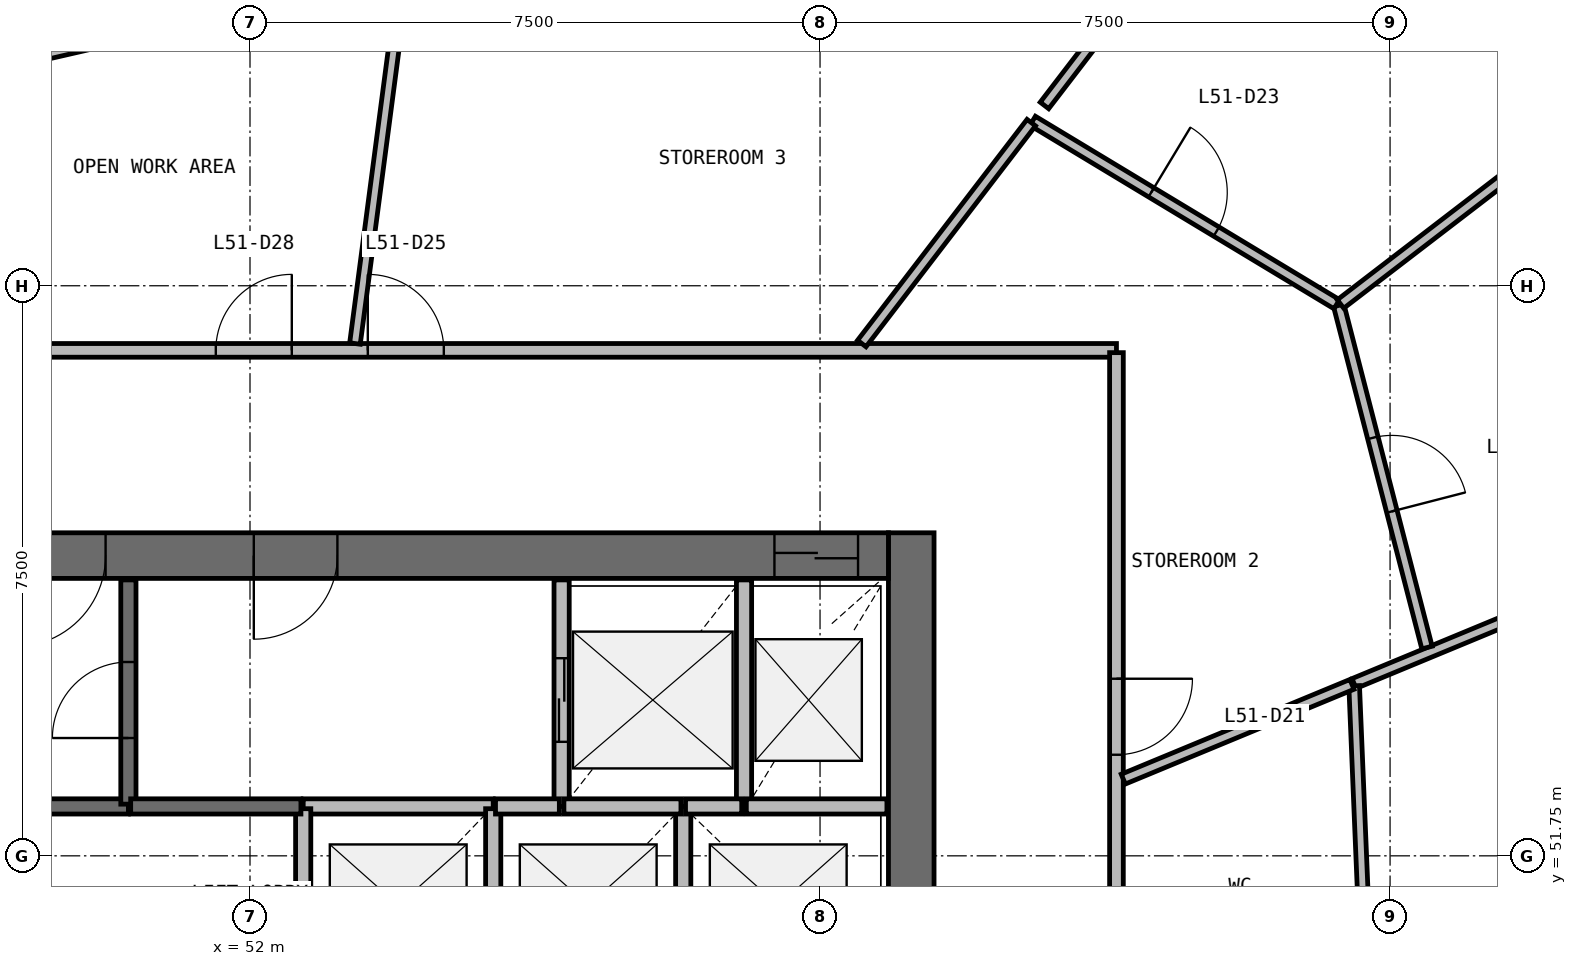
"""IFC4 building model, lengths in metres.
Left out: names, types, materials, properties, quantities, classifications, styles, units other than length and angle.
Written with IfcOpenShell. Run it as: python <this file> out.ifc"""

import sys

from ifc_helpers import new_model, si_unit, direction, frame, frame_2d, origin, place, context, subcontext, project, spatial, rectangle, extrude, source, transform, mapped, element, fill, save


model = new_model("IFC4")
c1 = context("Model", 3, precision=1e-05, world=origin(), true_north=direction((0.0, 1.0)))
c2 = subcontext(c1, "Body", "Model", "MODEL_VIEW")
j1 = project(units=[si_unit("LENGTHUNIT", "METRE"), si_unit("PLANEANGLEUNIT", "RADIAN")], contexts=[c1])
p1 = place(None, origin())
s1 = spatial("IfcSite", under=j1, at=p1, CompositionType="ELEMENT")
p2 = place(p1, origin())
s2 = spatial("IfcBuilding", under=s1, at=p2, CompositionType="ELEMENT")
p3 = place(p2, frame((0.0, 0.0, 211.1)))
s3 = spatial("IfcBuildingStorey", under=s2, at=p3, CompositionType="ELEMENT", Elevation=211.1)
p4 = place(p3, frame((60.7, 40.0, 0.0), z_axis=(0.0, 0.0, 1.0), x_axis=(0.0, 1.0, 0.0)))
e1 = element("IfcWall", 1, at=p4, inside=s3, PredefinedType="SHEAR", context=c2, shape_type="SweptSolid", body=[
    extrude(rectangle(XDim=16.0, YDim=0.6, at=frame_2d((8.0, 0.0))), origin(), (0.0, 0.0, 1.0), 3.9),
])
p5 = place(p4, frame((7.1, 0.0, 0.0)))
e2 = element("IfcOpeningElement", 2, at=p5, cuts=e1, PredefinedType="OPENING", context=c2, shape_type="SweptSolid", body=[
    extrude(rectangle(XDim=1.8, YDim=2.1, at=frame_2d((0.9, 1.05))), frame((0.0, 0.31, 0.0), z_axis=(0.0, -1.0, 0.0), x_axis=(1.0, 0.0, 0.0)), (0.0, 0.0, 1.0), 0.62),
])
p6 = place(p3, frame((60.4, 55.7, 0.0), z_axis=(0.0, 0.0, 1.0), x_axis=(-1.0, 0.0, 0.0)))
e3 = element("IfcWall", 3, at=p6, inside=s3, PredefinedType="SHEAR", context=c2, shape_type="SweptSolid", body=[
    extrude(rectangle(XDim=16.8, YDim=0.6, at=frame_2d((8.4, 0.0))), origin(), (0.0, 0.0, 1.0), 3.9),
])
p7 = place(p6, frame((0.4, 0.0, 0.0)))
e4 = element("IfcOpeningElement", 4, at=p7, cuts=e3, PredefinedType="OPENING", context=c2, shape_type="SweptSolid", body=[
    extrude(rectangle(XDim=1.1, YDim=2.1, at=frame_2d((0.55, 1.05))), frame((0.0, 0.31, 0.0), z_axis=(0.0, -1.0, 0.0), x_axis=(1.0, 0.0, 0.0)), (0.0, 0.0, 1.0), 0.62),
])
p8 = place(p6, frame((10.3, 0.0, 0.0)))
e5 = element("IfcOpeningElement", 5, at=p8, cuts=e3, PredefinedType="OPENING", context=c2, shape_type="SweptSolid", body=[
    extrude(rectangle(XDim=1.2, YDim=2.1, at=frame_2d((0.6, 1.05))), frame((0.0, 0.31, 0.0), z_axis=(0.0, -1.0, 0.0), x_axis=(1.0, 0.0, 0.0)), (0.0, 0.0, 1.0), 0.62),
])
p9 = place(p6, frame((7.25, 0.0, 0.0)))
e6 = element("IfcOpeningElement", 6, at=p9, cuts=e3, PredefinedType="OPENING", context=c2, shape_type="SweptSolid", body=[
    extrude(rectangle(XDim=1.1, YDim=2.1, at=frame_2d((0.55, 1.05))), frame((0.0, 0.31, 0.0), z_axis=(0.0, -1.0, 0.0), x_axis=(1.0, 0.0, 0.0)), (0.0, 0.0, 1.0), 0.62),
])
p10 = place(p3, frame((43.62, 52.4, 0.0), z_axis=(0.0, 0.0, 1.0), x_axis=(1.0, 0.0, 0.0)))
e7 = element("IfcWall", 7, at=p10, inside=s3, PredefinedType="SOLIDWALL", context=c2, shape_type="SweptSolid", body=[
    extrude(rectangle(XDim=6.78, YDim=0.2, at=frame_2d((3.39, 0.0))), origin(), (0.0, 0.0, 1.0), 3.58),
])
p11 = place(p3, frame((50.4, 52.43, 0.0), z_axis=(0.0, 0.0, 1.0), x_axis=(0.0, 1.0, 0.0)))
e8 = element("IfcWall", 8, at=p11, inside=s3, PredefinedType="SOLIDWALL", context=c2, shape_type="SweptSolid", body=[
    extrude(rectangle(XDim=2.95, YDim=0.2, at=frame_2d((1.475, 0.0))), origin(), (0.0, 0.0, 1.0), 3.58),
])
p12 = place(p11, frame((0.87, 0.0, 0.0)))
e9 = element("IfcOpeningElement", 9, at=p12, cuts=e8, PredefinedType="OPENING", context=c2, shape_type="SweptSolid", body=[
    extrude(rectangle(XDim=1.0, YDim=2.1, at=frame_2d((0.5, 1.05))), frame((0.0, 0.11, 0.0), z_axis=(0.0, -1.0, 0.0), x_axis=(1.0, 0.0, 0.0)), (0.0, 0.0, 1.0), 0.22),
])
p13 = place(p3, frame((56.1, 55.38, 0.0), z_axis=(0.0, 0.0, 1.0), x_axis=(0.0, -1.0, 0.0)))
e10 = element("IfcWall", 10, at=p13, inside=s3, PredefinedType="SOLIDWALL", context=c2, shape_type="SweptSolid", body=[
    extrude(rectangle(XDim=2.98, YDim=0.2, at=frame_2d((1.49, 0.0))), origin(), (0.0, 0.0, 1.0), 3.58),
])
p14 = place(p13, frame((1.03, 0.0, 0.0)))
e11 = element("IfcOpeningElement", 11, at=p14, cuts=e10, PredefinedType="OPENING", context=c2, shape_type="SweptSolid", body=[
    extrude(rectangle(XDim=1.1, YDim=2.1, at=frame_2d((0.55, 1.05))), frame((0.0, 0.11, 0.0), z_axis=(0.0, -1.0, 0.0), x_axis=(1.0, 0.0, 0.0)), (0.0, 0.0, 1.0), 0.22),
])
p15 = place(p3, frame((58.5, 52.4, 0.0), z_axis=(0.0, 0.0, 1.0), x_axis=(0.0, 1.0, 0.0)))
e12 = element("IfcWall", 12, at=p15, inside=s3, PredefinedType="SOLIDWALL", context=c2, shape_type="SweptSolid", body=[
    extrude(rectangle(XDim=2.98, YDim=0.2, at=frame_2d((1.49, 0.0))), origin(), (0.0, 0.0, 1.0), 3.58),
])
p16 = place(p3, frame((55.2, 52.4, 0.0), z_axis=(0.0, 0.0, 1.0), x_axis=(-1.0, 0.0, 0.0)))
e13 = element("IfcWall", 13, at=p16, inside=s3, PredefinedType="SOLIDWALL", context=c2, shape_type="SweptSolid", body=[
    extrude(rectangle(XDim=2.5, YDim=0.2, at=frame_2d((1.25, 0.0))), origin(), (0.0, 0.0, 1.0), 3.58),
])
for number, where, z_axis, x_axis in (
    (14, (52.7, 52.37, 0.0), (0.0, 0.0, 1.0), (0.0, -1.0, 0.0)),
    (15, (55.2, 50.01, 0.0), (0.0, 0.0, 1.0), (0.0, 1.0, 0.0)),
):
    element("IfcWall", number, at=place(p3, frame(where, z_axis=z_axis, x_axis=x_axis)), inside=s3, PredefinedType="SOLIDWALL", context=c2, shape_type="SweptSolid", body=[
        extrude(rectangle(XDim=2.36, YDim=0.2, at=frame_2d((1.18, 0.0))), origin(), (0.0, 0.0, 1.0), 3.58),
    ])
p17 = place(p3, frame((57.7, 50.01, 0.0), z_axis=(0.0, 0.0, 1.0), x_axis=(0.0, 1.0, 0.0)))
e16 = element("IfcWall", 16, at=p17, inside=s3, PredefinedType="SOLIDWALL", context=c2, shape_type="SweptSolid", body=[
    extrude(rectangle(XDim=2.39, YDim=0.2, at=frame_2d((1.195, 0.0))), origin(), (0.0, 0.0, 1.0), 3.58),
])
p18 = place(p3, frame((50.43, 52.4, 0.0), z_axis=(0.0, 0.0, 1.0), x_axis=(1.0, 0.0, 0.0)))
e17 = element("IfcWall", 17, at=p18, inside=s3, PredefinedType="SOLIDWALL", context=c2, shape_type="SweptSolid", body=[
    extrude(rectangle(XDim=2.24, YDim=0.2, at=frame_2d((1.12, 0.0))), origin(), (0.0, 0.0, 1.0), 3.58),
])
p19 = place(p3, frame((60.38, 52.4, 0.0), z_axis=(0.0, 0.0, 1.0), x_axis=(-1.0, 0.0, 0.0)))
e18 = element("IfcWall", 18, at=p19, inside=s3, PredefinedType="SOLIDWALL", context=c2, shape_type="SweptSolid", body=[
    extrude(rectangle(XDim=1.85, YDim=0.2, at=frame_2d((0.925, 0.0))), origin(), (0.0, 0.0, 1.0), 3.58),
])
p20 = place(p3, frame((57.67, 52.4, 0.0), z_axis=(0.0, 0.0, 1.0), x_axis=(-1.0, 0.0, 0.0)))
e19 = element("IfcWall", 19, at=p20, inside=s3, PredefinedType="SOLIDWALL", context=c2, shape_type="SweptSolid", body=[
    extrude(rectangle(XDim=1.54, YDim=0.2, at=frame_2d((0.77, 0.0))), origin(), (0.0, 0.0, 1.0), 3.58),
])
p21 = place(p3, frame((56.07, 52.4, 0.0), z_axis=(0.0, 0.0, 1.0), x_axis=(-1.0, 0.0, 0.0)))
e20 = element("IfcWall", 20, at=p21, inside=s3, PredefinedType="SOLIDWALL", context=c2, shape_type="SweptSolid", body=[
    extrude(rectangle(XDim=0.84, YDim=0.2, at=frame_2d((0.42, 0.0))), origin(), (0.0, 0.0, 1.0), 3.58),
])
p22 = place(p3, frame((58.47, 52.4, 0.0), z_axis=(0.0, 0.0, 1.0), x_axis=(-1.0, 0.0, 0.0)))
e21 = element("IfcWall", 21, at=p22, inside=s3, PredefinedType="SOLIDWALL", context=c2, shape_type="SweptSolid", body=[
    extrude(rectangle(XDim=0.74, YDim=0.2, at=frame_2d((0.37, 0.0))), origin(), (0.0, 0.0, 1.0), 3.58),
])
p23 = place(p3, frame((40.6, 58.4, 0.0), z_axis=(0.0, 0.0, 1.0), x_axis=(1.0, 0.0, 0.0)))
e22 = element("IfcWall", 22, at=p23, inside=s3, PredefinedType="PARTITIONING", context=c2, shape_type="SweptSolid", body=[
    extrude(rectangle(XDim=22.8, YDim=0.18, at=frame_2d((11.4, 0.0))), origin(), (0.0, 0.0, 1.0), 2.88),
])
p24 = place(p23, frame((12.95, 0.0, 0.0)))
e23 = element("IfcOpeningElement", 23, at=p24, cuts=e22, PredefinedType="OPENING", context=c2, shape_type="SweptSolid", body=[
    extrude(rectangle(XDim=1.0, YDim=2.1, at=frame_2d((0.5, 1.05))), frame((0.0, 0.1, 0.0), z_axis=(0.0, -1.0, 0.0), x_axis=(1.0, 0.0, 0.0)), (0.0, 0.0, 1.0), 0.2),
])
p25 = place(p23, frame((10.95, 0.0, 0.0)))
e24 = element("IfcOpeningElement", 24, at=p25, cuts=e22, PredefinedType="OPENING", context=c2, shape_type="SweptSolid", body=[
    extrude(rectangle(XDim=1.0, YDim=2.1, at=frame_2d((0.5, 1.05))), frame((0.0, 0.1, 0.0), z_axis=(0.0, -1.0, 0.0), x_axis=(1.0, 0.0, 0.0)), (0.0, 0.0, 1.0), 0.2),
])
p26 = place(p3, frame((63.4, 58.37, 0.0), z_axis=(0.0, 0.0, 1.0), x_axis=(0.0, -1.0, 0.0)))
e25 = element("IfcWall", 25, at=p26, inside=s3, PredefinedType="PARTITIONING", context=c2, shape_type="SweptSolid", body=[
    extrude(rectangle(XDim=20.74, YDim=0.18, at=frame_2d((10.37, 0.0))), origin(), (0.0, 0.0, 1.0), 2.88),
])
p27 = place(p26, frame((9.99, 0.0, 0.0)))
e26 = element("IfcOpeningElement", 26, at=p27, cuts=e25, PredefinedType="OPENING", context=c2, shape_type="SweptSolid", body=[
    extrude(rectangle(XDim=0.9, YDim=2.1, at=frame_2d((0.45, 1.05))), frame((0.0, 0.1, 0.0), z_axis=(0.0, -1.0, 0.0), x_axis=(1.0, 0.0, 0.0)), (0.0, 0.0, 1.0), 0.2),
])
p28 = place(p26, frame((7.79, 0.0, 0.0)))
e27 = element("IfcOpeningElement", 27, at=p28, cuts=e25, PredefinedType="OPENING", context=c2, shape_type="SweptSolid", body=[
    extrude(rectangle(XDim=0.9, YDim=2.1, at=frame_2d((0.45, 1.05))), frame((0.0, 0.1, 0.0), z_axis=(0.0, -1.0, 0.0), x_axis=(1.0, 0.0, 0.0)), (0.0, 0.0, 1.0), 0.2),
])
p29 = place(p26, frame((4.29, 0.0, 0.0)))
e28 = element("IfcOpeningElement", 28, at=p29, cuts=e25, PredefinedType="OPENING", context=c2, shape_type="SweptSolid", body=[
    extrude(rectangle(XDim=1.0, YDim=2.1, at=frame_2d((0.5, 1.05))), frame((0.0, 0.1, 0.0), z_axis=(0.0, -1.0, 0.0), x_axis=(1.0, 0.0, 0.0)), (0.0, 0.0, 1.0), 0.2),
])
p30 = place(p26, frame((15.49, 0.0, 0.0)))
e29 = element("IfcOpeningElement", 29, at=p30, cuts=e25, PredefinedType="OPENING", context=c2, shape_type="SweptSolid", body=[
    extrude(rectangle(XDim=1.0, YDim=2.1, at=frame_2d((0.5, 1.05))), frame((0.0, 0.1, 0.0), z_axis=(0.0, -1.0, 0.0), x_axis=(1.0, 0.0, 0.0)), (0.0, 0.0, 1.0), 0.2),
])
p31 = place(p26, frame((12.09, 0.0, 0.0)))
e30 = element("IfcOpeningElement", 30, at=p31, cuts=e25, PredefinedType="OPENING", context=c2, shape_type="SweptSolid", body=[
    extrude(rectangle(XDim=1.0, YDim=2.1, at=frame_2d((0.5, 1.05))), frame((0.0, 0.1, 0.0), z_axis=(0.0, -1.0, 0.0), x_axis=(1.0, 0.0, 0.0)), (0.0, 0.0, 1.0), 0.2),
])
p32 = place(p3, frame((72.333, 56.422, 0.0), z_axis=(0.0, 0.0, 1.0), x_axis=(-0.92388853292, -0.382661702733, 0.0)))
e31 = element("IfcWall", 31, at=p32, inside=s3, PredefinedType="PARTITIONING", context=c2, shape_type="SweptSolid", body=[
    extrude(rectangle(XDim=6.285, YDim=0.14, at=frame_2d((3.143, 0.0))), origin(), (0.0, 0.0, 1.0), 2.88),
])
p33 = place(p32, frame((2.635, 0.0, 0.0)))
e32 = element("IfcOpeningElement", 32, at=p33, cuts=e31, PredefinedType="OPENING", context=c2, shape_type="SweptSolid", body=[
    extrude(rectangle(XDim=1.0, YDim=2.1, at=frame_2d((0.5, 1.05))), frame((0.0, 0.08, 0.0), z_axis=(0.0, -1.0, 0.0), x_axis=(1.0, 0.0, 0.0)), (0.0, 0.0, 1.0), 0.16),
])
p34 = place(p3, frame((53.381, 58.49, 0.0), z_axis=(0.0, 0.0, 1.0), x_axis=(0.130510929427, 0.991446870639, 0.0)))
e33 = element("IfcWall", 33, at=p34, inside=s3, PredefinedType="PARTITIONING", context=c2, shape_type="SweptSolid", body=[
    extrude(rectangle(XDim=4.926, YDim=0.14, at=frame_2d((2.463, 0.0))), origin(), (0.0, 0.0, 1.0), 2.88),
])
p35 = place(p3, frame((66.324, 58.991, 0.0), z_axis=(0.0, 0.0, 1.0), x_axis=(0.249819251726, -0.968292487561, 0.0)))
e34 = element("IfcWall", 34, at=p35, inside=s3, PredefinedType="PARTITIONING", context=c2, shape_type="SweptSolid", body=[
    extrude(rectangle(XDim=4.649, YDim=0.14, at=frame_2d((2.324, 0.0))), origin(), (0.0, 0.0, 1.0), 2.88),
])
p36 = place(p35, frame((1.799, 0.0, 0.0)))
e35 = element("IfcOpeningElement", 35, at=p36, cuts=e34, PredefinedType="OPENING", context=c2, shape_type="SweptSolid", body=[
    extrude(rectangle(XDim=1.0, YDim=2.1, at=frame_2d((0.5, 1.05))), frame((0.0, 0.08, 0.0), z_axis=(0.0, -1.0, 0.0), x_axis=(1.0, 0.0, 0.0)), (0.0, 0.0, 1.0), 0.16),
])
p37 = place(p3, frame((62.298, 61.42, 0.0), z_axis=(0.0, 0.0, 1.0), x_axis=(0.856310382511, -0.516461546298, 0.0)))
e36 = element("IfcWall", 36, at=p37, inside=s3, PredefinedType="PARTITIONING", context=c2, shape_type="SweptSolid", body=[
    extrude(rectangle(XDim=4.672, YDim=0.14, at=frame_2d((2.336, 0.0))), origin(), (0.0, 0.0, 1.0), 2.88),
])
p38 = place(p37, frame((1.823, 0.0, 0.0)))
e37 = element("IfcOpeningElement", 37, at=p38, cuts=e36, PredefinedType="OPENING", context=c2, shape_type="SweptSolid", body=[
    extrude(rectangle(XDim=1.0, YDim=2.1, at=frame_2d((0.5, 1.05))), frame((0.0, 0.08, 0.0), z_axis=(0.0, -1.0, 0.0), x_axis=(1.0, 0.0, 0.0)), (0.0, 0.0, 1.0), 0.16),
])
p39 = place(p3, frame((66.696, 49.935, 0.0), z_axis=(0.0, 0.0, 1.0), x_axis=(-0.041535399008, 0.999137032959, 0.0)))
e38 = element("IfcWall", 38, at=p39, inside=s3, PredefinedType="PARTITIONING", context=c2, shape_type="SweptSolid", body=[
    extrude(rectangle(XDim=4.056, YDim=0.14, at=frame_2d((2.028, 0.0))), origin(), (0.0, 0.0, 1.0), 2.88),
])
p40 = place(p3, frame((66.348, 59.01, 0.0), z_axis=(0.0, 0.0, 1.0), x_axis=(0.793347300472, 0.608769300173, 0.0)))
e39 = element("IfcWall", 39, at=p40, inside=s3, PredefinedType="PARTITIONING", context=c2, shape_type="SweptSolid", body=[
    extrude(rectangle(XDim=3.899, YDim=0.14, at=frame_2d((1.95, 0.0))), origin(), (0.0, 0.0, 1.0), 2.88),
])
p41 = place(p3, frame((46.388, 61.626, 0.0), z_axis=(0.0, 0.0, 1.0), x_axis=(0.974668578249, 0.223654113699, 0.0)))
e40 = element("IfcWall", 40, at=p41, inside=s3, PredefinedType="PARTITIONING", context=c2, shape_type="SweptSolid", body=[
    extrude(rectangle(XDim=3.772, YDim=0.14, at=frame_2d((1.886, 0.0))), origin(), (0.0, 0.0, 1.0), 2.88),
])
p42 = place(p41, frame((1.323, 0.0, 0.0)))
e41 = element("IfcOpeningElement", 41, at=p42, cuts=e40, PredefinedType="OPENING", context=c2, shape_type="SweptSolid", body=[
    extrude(rectangle(XDim=1.0, YDim=2.1, at=frame_2d((0.5, 1.05))), frame((0.0, 0.08, 0.0), z_axis=(0.0, -1.0, 0.0), x_axis=(1.0, 0.0, 0.0)), (0.0, 0.0, 1.0), 0.16),
])
p43 = place(p3, frame((60.049, 58.49, 0.0), z_axis=(0.0, 0.0, 1.0), x_axis=(0.60875050296, 0.793361724024, 0.0)))
e42 = element("IfcWall", 42, at=p43, inside=s3, PredefinedType="PARTITIONING", context=c2, shape_type="SweptSolid", body=[
    extrude(rectangle(XDim=3.663, YDim=0.14, at=frame_2d((1.832, 0.0))), origin(), (0.0, 0.0, 1.0), 2.88),
])
p44 = place(p3, frame((62.453, 61.622, 0.0), z_axis=(0.0, 0.0, 1.0), x_axis=(0.608872401912, 0.793268175455, 0.0)))
e43 = element("IfcWall", 43, at=p44, inside=s3, PredefinedType="PARTITIONING", context=c2, shape_type="SweptSolid", body=[
    extrude(rectangle(XDim=1.0, YDim=0.14, at=frame_2d((0.5, 0.0))), origin(), (0.0, 0.0, 1.0), 2.88),
])
p45 = place(p3, frame((63.49, 52.759, 0.0), z_axis=(0.0, 0.0, 1.0), x_axis=(0.923862401464, 0.382724787753, 0.0)))
e44 = element("IfcWall", 44, at=p45, inside=s3, PredefinedType="PARTITIONING", context=c2, shape_type="SweptSolid", body=[
    extrude(rectangle(XDim=3.257, YDim=0.14, at=frame_2d((1.628, 0.0))), origin(), (0.0, 0.0, 1.0), 2.88),
])
m1 = source(origin(), c2, "Body", "SweptSolid", [
    extrude(rectangle(XDim=1.1, YDim=2.1, at=frame_2d((0.55, 1.05))), frame((0.0, 0.025, 0.0), z_axis=(0.0, -1.0, 0.0), x_axis=(1.0, 0.0, 0.0)), (0.0, 0.0, 1.0), 0.05),
])
p46 = place(p14, origin())
e45 = element("IfcDoor", 45, at=p46, inside=s3, OperationType="DOUBLE_DOOR_SLIDING", PredefinedType="USERDEFINED", context=c2, shape_type="MappedRepresentation", body=[
    mapped(m1, transform((0.0, 0.0, 0.0), scale=1.0)),
])
fill(e11, e45)
p47 = place(p7, origin())
e46 = element("IfcDoor", 46, at=p47, inside=s3, OperationType="DOUBLE_DOOR_SLIDING", PredefinedType="USERDEFINED", context=c2, shape_type="MappedRepresentation", body=[
    mapped(m1, transform((0.0, 0.0, 0.0), scale=1.0)),
])
fill(e4, e46)
m2 = source(origin(), c2, "Body", "SweptSolid", [
    extrude(rectangle(XDim=1.2, YDim=2.1, at=frame_2d((0.6, 1.05))), frame((0.0, 0.025, 0.0), z_axis=(0.0, -1.0, 0.0), x_axis=(1.0, 0.0, 0.0)), (0.0, 0.0, 1.0), 0.05),
])
p48 = place(p8, origin())
e47 = element("IfcDoor", 47, at=p48, inside=s3, OperationType="SINGLE_SWING_RIGHT", PredefinedType="DOOR", context=c2, shape_type="MappedRepresentation", body=[
    mapped(m2, transform((0.0, 0.0, 0.0), scale=1.0)),
])
fill(e5, e47)
m3 = source(origin(), c2, "Body", "SweptSolid", [
    extrude(rectangle(XDim=1.0, YDim=2.1, at=frame_2d((0.5, 1.05))), frame((0.0, 0.025, 0.0), z_axis=(0.0, -1.0, 0.0), x_axis=(1.0, 0.0, 0.0)), (0.0, 0.0, 1.0), 0.05),
])
p49 = place(p12, origin())
e48 = element("IfcDoor", 48, at=p49, inside=s3, OperationType="SINGLE_SWING_LEFT", PredefinedType="DOOR", context=c2, shape_type="MappedRepresentation", body=[
    mapped(m3, transform((0.0, 0.0, 0.0), scale=1.0)),
])
fill(e9, e48)
m4 = source(origin(), c2, "Body", "SweptSolid", [
    extrude(rectangle(XDim=1.1, YDim=2.1, at=frame_2d((0.55, 1.05))), frame((0.0, 0.025, 0.0), z_axis=(0.0, -1.0, 0.0), x_axis=(1.0, 0.0, 0.0)), (0.0, 0.0, 1.0), 0.05),
])
p50 = place(p9, origin())
e49 = element("IfcDoor", 49, at=p50, inside=s3, OperationType="SINGLE_SWING_RIGHT", PredefinedType="DOOR", context=c2, shape_type="MappedRepresentation", body=[
    mapped(m4, transform((0.0, 0.0, 0.0), scale=1.0)),
])
fill(e6, e49)
m5 = source(origin(), c2, "Body", "SweptSolid", [
    extrude(rectangle(XDim=1.0, YDim=2.1, at=frame_2d((0.5, 1.05))), frame((0.0, 0.025, 0.0), z_axis=(0.0, -1.0, 0.0), x_axis=(1.0, 0.0, 0.0)), (0.0, 0.0, 1.0), 0.05),
])
p51 = place(p29, origin())
e50 = element("IfcDoor", 50, at=p51, inside=s3, OperationType="SINGLE_SWING_LEFT", PredefinedType="DOOR", context=c2, shape_type="MappedRepresentation", body=[
    mapped(m5, transform((0.0, 0.0, 0.0), scale=1.0)),
])
fill(e28, e50)
p52 = place(p36, origin())
e51 = element("IfcDoor", 51, at=p52, inside=s3, OperationType="SINGLE_SWING_RIGHT", PredefinedType="DOOR", context=c2, shape_type="MappedRepresentation", body=[
    mapped(m5, transform((0.0, 0.0, 0.0), scale=1.0)),
])
fill(e35, e51)
p53 = place(p38, origin())
e52 = element("IfcDoor", 52, at=p53, inside=s3, OperationType="SINGLE_SWING_LEFT", PredefinedType="DOOR", context=c2, shape_type="MappedRepresentation", body=[
    mapped(m5, transform((0.0, 0.0, 0.0), scale=1.0)),
])
fill(e37, e52)
p54 = place(p24, origin())
e53 = element("IfcDoor", 53, at=p54, inside=s3, OperationType="SINGLE_SWING_LEFT", PredefinedType="DOOR", context=c2, shape_type="MappedRepresentation", body=[
    mapped(m5, transform((0.0, 0.0, 0.0), scale=1.0)),
])
fill(e23, e53)
p55 = place(p25, origin())
e54 = element("IfcDoor", 54, at=p55, inside=s3, OperationType="SINGLE_SWING_RIGHT", PredefinedType="DOOR", context=c2, shape_type="MappedRepresentation", body=[
    mapped(m5, transform((0.0, 0.0, 0.0), scale=1.0)),
])
fill(e24, e54)
save(model, sys.argv[1])
